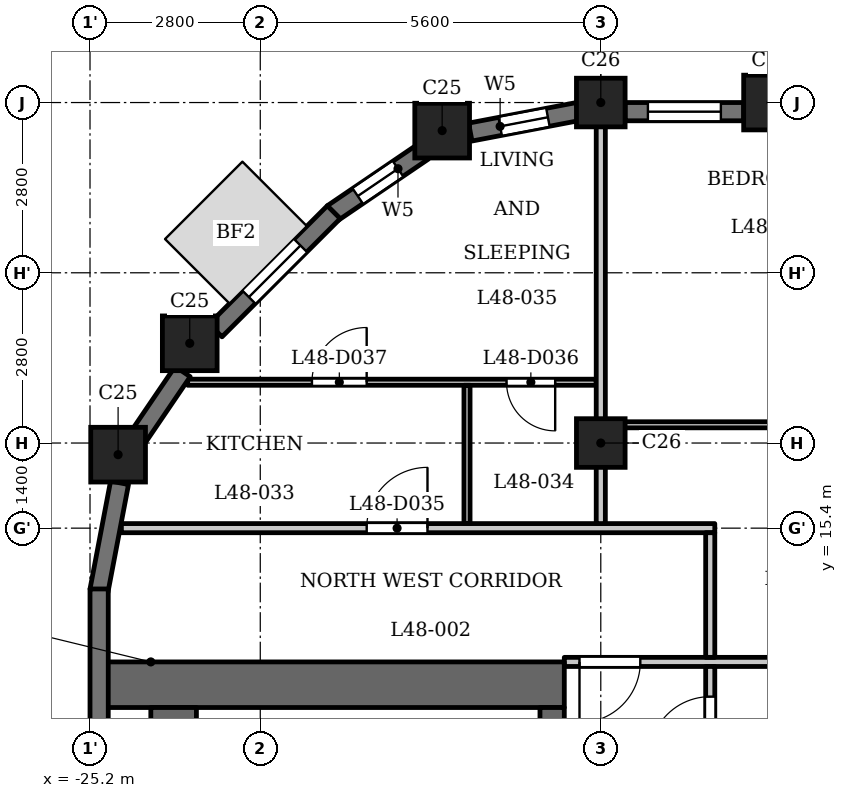
"""IFC4 building model, lengths in metres.
Left out: names, types, materials, properties, quantities, classifications, styles, units other than length and angle.
Written with IfcOpenShell. Run it as: python <this file> out.ifc"""

import sys

from ifc_helpers import new_model, si_unit, direction, frame, frame_2d, origin, origin_2d, place, context, subcontext, project, spatial, rectangle, extrude, element, fill, save


model = new_model("IFC4")
c1 = context("Model", 3, precision=1e-05, world=origin(), true_north=direction((0.0, 1.0)))
c2 = subcontext(c1, "Body", "Model", "MODEL_VIEW")
j1 = project(units=[si_unit("LENGTHUNIT", "METRE"), si_unit("PLANEANGLEUNIT", "RADIAN")], contexts=[c1])
p1 = place(None, origin())
s1 = spatial("IfcSite", under=j1, at=p1, CompositionType="ELEMENT")
p2 = place(p1, origin())
s2 = spatial("IfcBuilding", under=s1, at=p2, CompositionType="ELEMENT")
p3 = place(p2, frame((0.0, 0.0, 188.9)))
s3 = spatial("IfcBuildingStorey", under=s2, at=p3, CompositionType="ELEMENT", Elevation=188.9)
for number, where, z_axis, x_axis in (
    (1, (-14.0, 22.4, 0.0), (0.0, 0.0, 1.0), (1.0, 0.0, 0.0)),
    (2, (-19.409, 21.938, 0.0), (0.0, 0.0, 1.0), (1.0, 0.0, 0.0)),
    (3, (-23.56, 18.44, 0.0), (0.0, 0.0, 1.0), (1.0, 0.0, 0.0)),
    (4, (-24.738, 16.609, 0.0), (0.0, 0.0, 1.0), (1.0, 0.0, 0.0)),
):
    element("IfcColumn", number, at=place(p3, frame(where, z_axis=z_axis, x_axis=x_axis)), inside=s3, PredefinedType="COLUMN", context=c2, shape_type="SweptSolid", body=[
        extrude(rectangle(XDim=0.9, YDim=0.9, at=origin_2d()), origin(), (0.0, 0.0, 1.0), 3.5),
    ])
for number, where, z_axis, x_axis in (
    (5, (-16.8, 16.8, 0.0), (0.0, 0.0, 1.0), (1.0, 0.0, 0.0)),
    (6, (-16.8, 22.4, 0.0), (0.0, 0.0, 1.0), (1.0, 0.0, 0.0)),
):
    element("IfcColumn", number, at=place(p3, frame(where, z_axis=z_axis, x_axis=x_axis)), inside=s3, PredefinedType="COLUMN", context=c2, shape_type="SweptSolid", body=[
        extrude(rectangle(XDim=0.8, YDim=0.8, at=origin_2d()), origin(), (0.0, 0.0, 1.0), 3.5),
    ])
p4 = place(p3, frame((-14.45, 22.25, 0.0), z_axis=(0.0, 0.0, 1.0), x_axis=(-1.0, 0.0, 0.0)))
e7 = element("IfcWall", 7, at=p4, inside=s3, PredefinedType="SOLIDWALL", context=c2, shape_type="SweptSolid", body=[
    extrude(rectangle(XDim=1.95, YDim=0.3, at=frame_2d((0.975, 0.0))), origin(), (0.0, 0.0, 1.0), 2.5),
])
p5 = place(p4, frame((0.375, 0.0, 0.6)))
e8 = element("IfcOpeningElement", 8, at=p5, cuts=e7, PredefinedType="OPENING", context=c2, shape_type="SweptSolid", body=[
    extrude(rectangle(XDim=1.2, YDim=1.55, at=frame_2d((0.6, 0.775))), frame((0.0, 0.16, 0.0), z_axis=(0.0, -1.0, 0.0), x_axis=(1.0, 0.0, 0.0)), (0.0, 0.0, 1.0), 0.32),
])
p6 = place(p3, frame((-17.179, 22.251, 0.0), z_axis=(0.0, 0.0, 1.0), x_axis=(-0.98230529033, -0.187286722942, 0.0)))
e9 = element("IfcWall", 9, at=p6, inside=s3, PredefinedType="SOLIDWALL", context=c2, shape_type="SweptSolid", body=[
    extrude(rectangle(XDim=1.799, YDim=0.3, at=frame_2d((0.899, 0.0))), origin(), (0.0, 0.0, 1.0), 2.5),
])
p7 = place(p6, frame((0.5, 0.0, 0.6)))
e10 = element("IfcOpeningElement", 10, at=p7, cuts=e9, PredefinedType="OPENING", context=c2, shape_type="SweptSolid", body=[
    extrude(rectangle(XDim=0.8, YDim=1.55, at=frame_2d((0.4, 0.775))), frame((0.0, 0.16, 0.0), z_axis=(0.0, -1.0, 0.0), x_axis=(1.0, 0.0, 0.0)), (0.0, 0.0, 1.0), 0.32),
])
p8 = place(p3, frame((-19.719, 21.594, 0.0), z_axis=(0.0, 0.0, 1.0), x_axis=(-0.827067282455, -0.562102935673, 0.0)))
e11 = element("IfcWall", 11, at=p8, inside=s3, PredefinedType="SOLIDWALL", context=c2, shape_type="SweptSolid", body=[
    extrude(rectangle(XDim=1.806, YDim=0.3, at=frame_2d((0.903, 0.0))), origin(), (0.0, 0.0, 1.0), 2.5),
])
p9 = place(p8, frame((0.503, 0.0, 0.6)))
e12 = element("IfcOpeningElement", 12, at=p9, cuts=e11, PredefinedType="OPENING", context=c2, shape_type="SweptSolid", body=[
    extrude(rectangle(XDim=0.8, YDim=1.55, at=frame_2d((0.4, 0.775))), frame((0.0, 0.16, 0.0), z_axis=(0.0, -1.0, 0.0), x_axis=(1.0, 0.0, 0.0)), (0.0, 0.0, 1.0), 0.32),
])
p10 = place(p3, frame((-21.191, 20.597, 0.0), z_axis=(0.0, 0.0, 1.0), x_axis=(-0.707106781187, -0.707106781187, 0.0)))
e13 = element("IfcWall", 13, at=p10, inside=s3, PredefinedType="SOLIDWALL", context=c2, shape_type="SweptSolid", body=[
    extrude(rectangle(XDim=2.75, YDim=0.3, at=frame_2d((1.375, 0.0))), origin(), (0.0, 0.0, 1.0), 2.5),
])
p11 = place(p10, frame((0.775, 0.0, 0.6)))
e14 = element("IfcOpeningElement", 14, at=p11, cuts=e13, PredefinedType="OPENING", context=c2, shape_type="SweptSolid", body=[
    extrude(rectangle(XDim=1.2, YDim=1.55, at=frame_2d((0.6, 0.775))), frame((0.0, 0.16, 0.0), z_axis=(0.0, -1.0, 0.0), x_axis=(1.0, 0.0, 0.0)), (0.0, 0.0, 1.0), 0.32),
])
p12 = place(p3, frame((-23.676, 17.975, 0.0), z_axis=(0.0, 0.0, 1.0), x_axis=(-0.56200149592, -0.827136215253, 0.0)))
e15 = element("IfcWall", 15, at=p12, inside=s3, PredefinedType="SOLIDWALL", context=c2, shape_type="SweptSolid", body=[
    extrude(rectangle(XDim=1.277, YDim=0.3, at=frame_2d((0.639, 0.0))), origin(), (0.0, 0.0, 1.0), 2.5),
])
p13 = place(p3, frame((-24.714, 16.146, 0.0), z_axis=(0.0, 0.0, 1.0), x_axis=(-0.187348135549, -0.982293579388, 0.0)))
e16 = element("IfcWall", 16, at=p13, inside=s3, PredefinedType="SOLIDWALL", context=c2, shape_type="SweptSolid", body=[
    extrude(rectangle(XDim=1.806, YDim=0.3, at=frame_2d((0.903, 0.0))), origin(), (0.0, 0.0, 1.0), 2.5),
])
p14 = place(p3, frame((-25.05, 14.4, 0.0), z_axis=(0.0, 0.0, 1.0), x_axis=(0.0, -1.0, 0.0)))
e17 = element("IfcWall", 17, at=p14, inside=s3, PredefinedType="SOLIDWALL", context=c2, shape_type="SweptSolid", body=[
    extrude(rectangle(XDim=2.75, YDim=0.3, at=frame_2d((1.375, 0.0))), origin(), (0.0, 0.0, 1.0), 2.5),
])
p15 = place(p3, frame((-17.4, 12.825, 0.0), z_axis=(0.0, 0.0, 1.0), x_axis=(-1.0, 0.0, 0.0)))
e18 = element("IfcWall", 18, at=p15, inside=s3, PredefinedType="SHEAR", context=c2, shape_type="SweptSolid", body=[
    extrude(rectangle(XDim=7.6, YDim=0.75, at=frame_2d((3.8, 0.0))), origin(), (0.0, 0.0, 1.0), 3.2),
])
p16 = place(p3, frame((-17.6, -12.45, 0.0), z_axis=(0.0, 0.0, 1.0), x_axis=(0.0, 1.0, 0.0)))
e19 = element("IfcWall", 19, at=p16, inside=s3, PredefinedType="SHEAR", context=c2, shape_type="SweptSolid", body=[
    extrude(rectangle(XDim=24.9, YDim=0.4, at=frame_2d((12.45, 0.0))), origin(), (0.0, 0.0, 1.0), 3.2),
])
p17 = place(p16, frame((6.325, 0.0, 0.0)))
e20 = element("IfcOpeningElement", 20, at=p17, cuts=e19, PredefinedType="OPENING", context=c2, shape_type="SweptSolid", body=[
    extrude(rectangle(XDim=0.9, YDim=2.1, at=frame_2d((0.45, 1.05))), frame((0.0, 0.21, 0.0), z_axis=(0.0, -1.0, 0.0), x_axis=(1.0, 0.0, 0.0)), (0.0, 0.0, 1.0), 0.42),
])
p18 = place(p16, frame((9.925, 0.0, 0.0)))
e21 = element("IfcOpeningElement", 21, at=p18, cuts=e19, PredefinedType="OPENING", context=c2, shape_type="SweptSolid", body=[
    extrude(rectangle(XDim=0.9, YDim=2.1, at=frame_2d((0.45, 1.05))), frame((0.0, 0.21, 0.0), z_axis=(0.0, -1.0, 0.0), x_axis=(1.0, 0.0, 0.0)), (0.0, 0.0, 1.0), 0.42),
])
p19 = place(p16, frame((15.6, 0.0, 0.0)))
e22 = element("IfcOpeningElement", 22, at=p19, cuts=e19, PredefinedType="OPENING", context=c2, shape_type="SweptSolid", body=[
    extrude(rectangle(XDim=1.1, YDim=2.1, at=frame_2d((0.55, 1.05))), frame((0.0, 0.21, 0.0), z_axis=(0.0, -1.0, 0.0), x_axis=(1.0, 0.0, 0.0)), (0.0, 0.0, 1.0), 0.42),
])
p20 = place(p16, frame((18.0, 0.0, 0.0)))
e23 = element("IfcOpeningElement", 23, at=p20, cuts=e19, PredefinedType="OPENING", context=c2, shape_type="SweptSolid", body=[
    extrude(rectangle(XDim=1.1, YDim=2.1, at=frame_2d((0.55, 1.05))), frame((0.0, 0.21, 0.0), z_axis=(0.0, -1.0, 0.0), x_axis=(1.0, 0.0, 0.0)), (0.0, 0.0, 1.0), 0.42),
])
p21 = place(p16, frame((23.025, 0.0, 0.0)))
e24 = element("IfcOpeningElement", 24, at=p21, cuts=e19, PredefinedType="OPENING", context=c2, shape_type="SweptSolid", body=[
    extrude(rectangle(XDim=1.1, YDim=2.1, at=frame_2d((0.55, 1.05))), frame((0.0, 0.21, 0.0), z_axis=(0.0, -1.0, 0.0), x_axis=(1.0, 0.0, 0.0)), (0.0, 0.0, 1.0), 0.42),
])
p22 = place(p16, frame((0.775, 0.0, 0.0)))
e25 = element("IfcOpeningElement", 25, at=p22, cuts=e19, PredefinedType="OPENING", context=c2, shape_type="SweptSolid", body=[
    extrude(rectangle(XDim=1.1, YDim=2.1, at=frame_2d((0.55, 1.05))), frame((0.0, 0.21, 0.0), z_axis=(0.0, -1.0, 0.0), x_axis=(1.0, 0.0, 0.0)), (0.0, 0.0, 1.0), 0.42),
])
p23 = place(p16, frame((12.925, 0.0, 0.0)))
e26 = element("IfcOpeningElement", 26, at=p23, cuts=e19, PredefinedType="OPENING", context=c2, shape_type="SweptSolid", body=[
    extrude(rectangle(XDim=1.8, YDim=2.1, at=frame_2d((0.9, 1.05))), frame((0.0, 0.21, 0.0), z_axis=(0.0, -1.0, 0.0), x_axis=(1.0, 0.0, 0.0)), (0.0, 0.0, 1.0), 0.42),
])
p24 = place(p3, frame((-23.825, -12.45, 0.0), z_axis=(0.0, 0.0, 1.0), x_axis=(0.0, 1.0, 0.0)))
e27 = element("IfcWall", 27, at=p24, inside=s3, PredefinedType="SHEAR", context=c2, shape_type="SweptSolid", body=[
    extrude(rectangle(XDim=24.9, YDim=0.75, at=frame_2d((12.45, 0.0))), origin(), (0.0, 0.0, 1.0), 3.2),
])
p25 = place(p3, frame((-17.4, 13.2, 0.0), z_axis=(0.0, 0.0, 1.0), x_axis=(1.0, 0.0, 0.0)))
e28 = element("IfcWall", 28, at=p25, inside=s3, PredefinedType="PARTITIONING", context=c2, shape_type="SweptSolid", body=[
    extrude(rectangle(XDim=34.8, YDim=0.15, at=frame_2d((17.4, 0.0))), origin(), (0.0, 0.0, 1.0), 3.2),
])
p26 = place(p25, frame((0.25, 0.0, 0.0)))
e29 = element("IfcOpeningElement", 29, at=p26, cuts=e28, PredefinedType="OPENING", context=c2, shape_type="SweptSolid", body=[
    extrude(rectangle(XDim=1.0, YDim=2.1, at=frame_2d((0.5, 1.05))), frame((0.0, 0.085, 0.0), z_axis=(0.0, -1.0, 0.0), x_axis=(1.0, 0.0, 0.0)), (0.0, 0.0, 1.0), 0.17),
])
p27 = place(p25, frame((33.65, 0.0, 0.0)))
e30 = element("IfcOpeningElement", 30, at=p27, cuts=e28, PredefinedType="OPENING", context=c2, shape_type="SweptSolid", body=[
    extrude(rectangle(XDim=1.0, YDim=2.1, at=frame_2d((0.5, 1.05))), frame((0.0, 0.085, 0.0), z_axis=(0.0, -1.0, 0.0), x_axis=(1.0, 0.0, 0.0)), (0.0, 0.0, 1.0), 0.17),
])
p28 = place(p25, frame((10.15, 0.0, 0.0)))
e31 = element("IfcOpeningElement", 31, at=p28, cuts=e28, PredefinedType="OPENING", context=c2, shape_type="SweptSolid", body=[
    extrude(rectangle(XDim=1.0, YDim=2.1, at=frame_2d((0.5, 1.05))), frame((0.0, 0.085, 0.0), z_axis=(0.0, -1.0, 0.0), x_axis=(1.0, 0.0, 0.0)), (0.0, 0.0, 1.0), 0.17),
])
p29 = place(p25, frame((13.55, 0.0, 0.0)))
e32 = element("IfcOpeningElement", 32, at=p29, cuts=e28, PredefinedType="OPENING", context=c2, shape_type="SweptSolid", body=[
    extrude(rectangle(XDim=1.0, YDim=2.1, at=frame_2d((0.5, 1.05))), frame((0.0, 0.085, 0.0), z_axis=(0.0, -1.0, 0.0), x_axis=(1.0, 0.0, 0.0)), (0.0, 0.0, 1.0), 0.17),
])
p30 = place(p25, frame((20.85, 0.0, 0.0)))
e33 = element("IfcOpeningElement", 33, at=p30, cuts=e28, PredefinedType="OPENING", context=c2, shape_type="SweptSolid", body=[
    extrude(rectangle(XDim=1.0, YDim=2.1, at=frame_2d((0.5, 1.05))), frame((0.0, 0.085, 0.0), z_axis=(0.0, -1.0, 0.0), x_axis=(1.0, 0.0, 0.0)), (0.0, 0.0, 1.0), 0.17),
])
p31 = place(p25, frame((23.7, 0.0, 0.0)))
e34 = element("IfcOpeningElement", 34, at=p31, cuts=e28, PredefinedType="OPENING", context=c2, shape_type="SweptSolid", body=[
    extrude(rectangle(XDim=1.0, YDim=2.1, at=frame_2d((0.5, 1.05))), frame((0.0, 0.085, 0.0), z_axis=(0.0, -1.0, 0.0), x_axis=(1.0, 0.0, 0.0)), (0.0, 0.0, 1.0), 0.17),
])
p32 = place(p3, frame((-24.684, 15.4, 0.0), z_axis=(0.0, 0.0, 1.0), x_axis=(1.0, 0.0, 0.0)))
e35 = element("IfcWall", 35, at=p32, inside=s3, PredefinedType="PARTITIONING", context=c2, shape_type="SweptSolid", body=[
    extrude(rectangle(XDim=9.759, YDim=0.15, at=frame_2d((4.879, 0.0))), origin(), (0.0, 0.0, 1.0), 3.2),
])
p33 = place(p32, frame((4.034, 0.0, 0.0)))
e36 = element("IfcOpeningElement", 36, at=p33, cuts=e35, PredefinedType="OPENING", context=c2, shape_type="SweptSolid", body=[
    extrude(rectangle(XDim=1.0, YDim=2.1, at=frame_2d((0.5, 1.05))), frame((0.0, 0.085, 0.0), z_axis=(0.0, -1.0, 0.0), x_axis=(1.0, 0.0, 0.0)), (0.0, 0.0, 1.0), 0.17),
])
p34 = place(p3, frame((-16.725, 17.1, 0.0), z_axis=(0.0, 0.0, 1.0), x_axis=(1.0, 0.0, 0.0)))
e37 = element("IfcWall", 37, at=p34, inside=s3, PredefinedType="PARTITIONING", context=c2, shape_type="SweptSolid", body=[
    extrude(rectangle(XDim=33.45, YDim=0.1, at=frame_2d((16.725, 0.0))), origin(), (0.0, 0.0, 1.0), 3.2),
])
p35 = place(p34, frame((4.075, 0.0, 0.0)))
e38 = element("IfcOpeningElement", 38, at=p35, cuts=e37, PredefinedType="OPENING", context=c2, shape_type="SweptSolid", body=[
    extrude(rectangle(XDim=0.8, YDim=2.1, at=frame_2d((0.4, 1.05))), frame((0.0, 0.06, 0.0), z_axis=(0.0, -1.0, 0.0), x_axis=(1.0, 0.0, 0.0)), (0.0, 0.0, 1.0), 0.12),
])
p36 = place(p34, frame((9.575, 0.0, 0.0)))
e39 = element("IfcOpeningElement", 39, at=p36, cuts=e37, PredefinedType="OPENING", context=c2, shape_type="SweptSolid", body=[
    extrude(rectangle(XDim=0.9, YDim=2.1, at=frame_2d((0.45, 1.05))), frame((0.0, 0.06, 0.0), z_axis=(0.0, -1.0, 0.0), x_axis=(1.0, 0.0, 0.0)), (0.0, 0.0, 1.0), 0.12),
])
p37 = place(p34, frame((15.175, 0.0, 0.0)))
e40 = element("IfcOpeningElement", 40, at=p37, cuts=e37, PredefinedType="OPENING", context=c2, shape_type="SweptSolid", body=[
    extrude(rectangle(XDim=0.8, YDim=2.1, at=frame_2d((0.4, 1.05))), frame((0.0, 0.06, 0.0), z_axis=(0.0, -1.0, 0.0), x_axis=(1.0, 0.0, 0.0)), (0.0, 0.0, 1.0), 0.12),
])
p38 = place(p34, frame((12.975, 0.0, 0.0)))
e41 = element("IfcOpeningElement", 41, at=p38, cuts=e37, PredefinedType="OPENING", context=c2, shape_type="SweptSolid", body=[
    extrude(rectangle(XDim=0.9, YDim=2.1, at=frame_2d((0.45, 1.05))), frame((0.0, 0.06, 0.0), z_axis=(0.0, -1.0, 0.0), x_axis=(1.0, 0.0, 0.0)), (0.0, 0.0, 1.0), 0.12),
])
p39 = place(p34, frame((17.625, 0.0, 0.0)))
e42 = element("IfcOpeningElement", 42, at=p39, cuts=e37, PredefinedType="OPENING", context=c2, shape_type="SweptSolid", body=[
    extrude(rectangle(XDim=0.8, YDim=2.1, at=frame_2d((0.4, 1.05))), frame((0.0, 0.06, 0.0), z_axis=(0.0, -1.0, 0.0), x_axis=(1.0, 0.0, 0.0)), (0.0, 0.0, 1.0), 0.12),
])
p40 = place(p34, frame((20.025, 0.0, 0.0)))
e43 = element("IfcOpeningElement", 43, at=p40, cuts=e37, PredefinedType="OPENING", context=c2, shape_type="SweptSolid", body=[
    extrude(rectangle(XDim=0.9, YDim=2.1, at=frame_2d((0.45, 1.05))), frame((0.0, 0.06, 0.0), z_axis=(0.0, -1.0, 0.0), x_axis=(1.0, 0.0, 0.0)), (0.0, 0.0, 1.0), 0.12),
])
p41 = place(p34, frame((31.975, 0.0, 0.0)))
e44 = element("IfcOpeningElement", 44, at=p41, cuts=e37, PredefinedType="OPENING", context=c2, shape_type="SweptSolid", body=[
    extrude(rectangle(XDim=0.8, YDim=2.1, at=frame_2d((0.4, 1.05))), frame((0.0, 0.06, 0.0), z_axis=(0.0, -1.0, 0.0), x_axis=(1.0, 0.0, 0.0)), (0.0, 0.0, 1.0), 0.12),
])
p42 = place(p34, frame((29.775, 0.0, 0.0)))
e45 = element("IfcOpeningElement", 45, at=p42, cuts=e37, PredefinedType="OPENING", context=c2, shape_type="SweptSolid", body=[
    extrude(rectangle(XDim=0.9, YDim=2.1, at=frame_2d((0.45, 1.05))), frame((0.0, 0.06, 0.0), z_axis=(0.0, -1.0, 0.0), x_axis=(1.0, 0.0, 0.0)), (0.0, 0.0, 1.0), 0.12),
])
p43 = place(p34, frame((23.025, 0.0, 0.0)))
e46 = element("IfcOpeningElement", 46, at=p43, cuts=e37, PredefinedType="OPENING", context=c2, shape_type="SweptSolid", body=[
    extrude(rectangle(XDim=0.9, YDim=2.1, at=frame_2d((0.45, 1.05))), frame((0.0, 0.06, 0.0), z_axis=(0.0, -1.0, 0.0), x_axis=(1.0, 0.0, 0.0)), (0.0, 0.0, 1.0), 0.12),
])
p44 = place(p34, frame((26.125, 0.0, 0.0)))
e47 = element("IfcOpeningElement", 47, at=p44, cuts=e37, PredefinedType="OPENING", context=c2, shape_type="SweptSolid", body=[
    extrude(rectangle(XDim=0.9, YDim=2.1, at=frame_2d((0.45, 1.05))), frame((0.0, 0.06, 0.0), z_axis=(0.0, -1.0, 0.0), x_axis=(1.0, 0.0, 0.0)), (0.0, 0.0, 1.0), 0.12),
])
p45 = place(p3, frame((-23.594, 17.8, 0.0), z_axis=(0.0, 0.0, 1.0), x_axis=(1.0, 0.0, 0.0)))
e48 = element("IfcWall", 48, at=p45, inside=s3, PredefinedType="PARTITIONING", context=c2, shape_type="SweptSolid", body=[
    extrude(rectangle(XDim=6.719, YDim=0.1, at=frame_2d((3.359, 0.0))), origin(), (0.0, 0.0, 1.0), 3.2),
])
p46 = place(p45, frame((5.244, 0.0, 0.0)))
e49 = element("IfcOpeningElement", 49, at=p46, cuts=e48, PredefinedType="OPENING", context=c2, shape_type="SweptSolid", body=[
    extrude(rectangle(XDim=0.8, YDim=2.1, at=frame_2d((0.4, 1.05))), frame((0.0, 0.06, 0.0), z_axis=(0.0, -1.0, 0.0), x_axis=(1.0, 0.0, 0.0)), (0.0, 0.0, 1.0), 0.12),
])
p47 = place(p45, frame((2.044, 0.0, 0.0)))
e50 = element("IfcOpeningElement", 50, at=p47, cuts=e48, PredefinedType="OPENING", context=c2, shape_type="SweptSolid", body=[
    extrude(rectangle(XDim=0.9, YDim=2.1, at=frame_2d((0.45, 1.05))), frame((0.0, 0.06, 0.0), z_axis=(0.0, -1.0, 0.0), x_axis=(1.0, 0.0, 0.0)), (0.0, 0.0, 1.0), 0.12),
])
p48 = place(p3, frame((-19.0, 15.475, 0.0), z_axis=(0.0, 0.0, 1.0), x_axis=(0.0, 1.0, 0.0)))
e51 = element("IfcWall", 51, at=p48, inside=s3, PredefinedType="PARTITIONING", context=c2, shape_type="SweptSolid", body=[
    extrude(rectangle(XDim=2.275, YDim=0.1, at=frame_2d((1.137, 0.0))), origin(), (0.0, 0.0, 1.0), 3.2),
])
p49 = place(p3, frame((-16.8, 15.475, 0.0), z_axis=(0.0, 0.0, 1.0), x_axis=(0.0, 1.0, 0.0)))
e52 = element("IfcWall", 52, at=p49, inside=s3, PredefinedType="PARTITIONING", context=c2, shape_type="SweptSolid", body=[
    extrude(rectangle(XDim=6.835, YDim=0.15, at=frame_2d((3.417, 0.0))), origin(), (0.0, 0.0, 1.0), 2.55),
])
p50 = place(p3, frame((-15.0, 6.769, 0.0), z_axis=(0.0, 0.0, 1.0), x_axis=(0.0, 1.0, 0.0)))
e53 = element("IfcWall", 53, at=p50, inside=s3, PredefinedType="PARTITIONING", context=c2, shape_type="SweptSolid", body=[
    extrude(rectangle(XDim=6.356, YDim=0.15, at=frame_2d((3.178, 0.0))), origin(), (0.0, 0.0, 1.0), 3.2),
])
p51 = place(p50, frame((4.86, 0.0, 0.0)))
e54 = element("IfcOpeningElement", 54, at=p51, cuts=e53, PredefinedType="OPENING", context=c2, shape_type="SweptSolid", body=[
    extrude(rectangle(XDim=1.0, YDim=2.1, at=frame_2d((0.5, 1.05))), frame((0.0, 0.085, 0.0), z_axis=(0.0, -1.0, 0.0), x_axis=(1.0, 0.0, 0.0)), (0.0, 0.0, 1.0), 0.17),
])
p52 = place(p3, frame((-15.0, 13.275, 0.0), z_axis=(0.0, 0.0, 1.0), x_axis=(0.0, 1.0, 0.0)))
e55 = element("IfcWall", 55, at=p52, inside=s3, PredefinedType="PARTITIONING", context=c2, shape_type="SweptSolid", body=[
    extrude(rectangle(XDim=2.05, YDim=0.15, at=frame_2d((1.025, 0.0))), origin(), (0.0, 0.0, 1.0), 3.2),
])
p53 = place(p51, origin())
e56 = element("IfcDoor", 56, at=p53, inside=s3, OperationType="SINGLE_SWING_RIGHT", PredefinedType="DOOR", context=c2, shape_type="SweptSolid", body=[
    extrude(rectangle(XDim=1.0, YDim=2.1, at=frame_2d((0.5, 1.05))), frame((0.0, 0.025, 0.0), z_axis=(0.0, -1.0, 0.0), x_axis=(1.0, 0.0, 0.0)), (0.0, 0.0, 1.0), 0.05),
])
fill(e54, e56)
p54 = place(p26, origin())
e57 = element("IfcDoor", 57, at=p54, inside=s3, OperationType="SINGLE_SWING_LEFT", PredefinedType="DOOR", context=c2, shape_type="SweptSolid", body=[
    extrude(rectangle(XDim=1.0, YDim=2.1, at=frame_2d((0.5, 1.05))), frame((0.0, 0.025, 0.0), z_axis=(0.0, -1.0, 0.0), x_axis=(1.0, 0.0, 0.0)), (0.0, 0.0, 1.0), 0.05),
])
fill(e29, e57)
p55 = place(p33, origin())
e58 = element("IfcDoor", 58, at=p55, inside=s3, OperationType="SINGLE_SWING_LEFT", PredefinedType="DOOR", context=c2, shape_type="SweptSolid", body=[
    extrude(rectangle(XDim=1.0, YDim=2.1, at=frame_2d((0.5, 1.05))), frame((0.0, 0.025, 0.0), z_axis=(0.0, -1.0, 0.0), x_axis=(1.0, 0.0, 0.0)), (0.0, 0.0, 1.0), 0.05),
])
fill(e36, e58)
p56 = place(p46, origin())
e59 = element("IfcDoor", 59, at=p56, inside=s3, OperationType="SINGLE_SWING_RIGHT", PredefinedType="DOOR", context=c2, shape_type="SweptSolid", body=[
    extrude(rectangle(XDim=0.8, YDim=2.1, at=frame_2d((0.4, 1.05))), frame((0.0, 0.025, 0.0), z_axis=(0.0, -1.0, 0.0), x_axis=(1.0, 0.0, 0.0)), (0.0, 0.0, 1.0), 0.05),
])
fill(e49, e59)
p57 = place(p47, origin())
e60 = element("IfcDoor", 60, at=p57, inside=s3, OperationType="SINGLE_SWING_LEFT", PredefinedType="DOOR", context=c2, shape_type="SweptSolid", body=[
    extrude(rectangle(XDim=0.9, YDim=2.1, at=frame_2d((0.45, 1.05))), frame((0.0, 0.025, 0.0), z_axis=(0.0, -1.0, 0.0), x_axis=(1.0, 0.0, 0.0)), (0.0, 0.0, 1.0), 0.05),
])
fill(e50, e60)
p58 = place(p5, origin())
e61 = element("IfcWindow", 61, at=p58, inside=s3, PartitioningType="SINGLE_PANEL", PredefinedType="WINDOW", context=c2, shape_type="SweptSolid", body=[
    extrude(rectangle(XDim=1.2, YDim=1.55, at=frame_2d((0.6, 0.775))), frame((0.0, 0.03, 0.0), z_axis=(0.0, -1.0, 0.0), x_axis=(1.0, 0.0, 0.0)), (0.0, 0.0, 1.0), 0.06),
])
fill(e8, e61)
p59 = place(p7, origin())
e62 = element("IfcWindow", 62, at=p59, inside=s3, PartitioningType="SINGLE_PANEL", PredefinedType="WINDOW", context=c2, shape_type="SweptSolid", body=[
    extrude(rectangle(XDim=0.8, YDim=1.55, at=frame_2d((0.4, 0.775))), frame((0.0, 0.03, 0.0), z_axis=(0.0, -1.0, 0.0), x_axis=(1.0, 0.0, 0.0)), (0.0, 0.0, 1.0), 0.06),
])
fill(e10, e62)
p60 = place(p9, origin())
e63 = element("IfcWindow", 63, at=p60, inside=s3, PartitioningType="SINGLE_PANEL", PredefinedType="WINDOW", context=c2, shape_type="SweptSolid", body=[
    extrude(rectangle(XDim=0.8, YDim=1.55, at=frame_2d((0.4, 0.775))), frame((0.0, 0.03, 0.0), z_axis=(0.0, -1.0, 0.0), x_axis=(1.0, 0.0, 0.0)), (0.0, 0.0, 1.0), 0.06),
])
fill(e12, e63)
p61 = place(p11, origin())
e64 = element("IfcWindow", 64, at=p61, inside=s3, PartitioningType="SINGLE_PANEL", PredefinedType="WINDOW", context=c2, shape_type="SweptSolid", body=[
    extrude(rectangle(XDim=1.2, YDim=1.55, at=frame_2d((0.6, 0.775))), frame((0.0, 0.03, 0.0), z_axis=(0.0, -1.0, 0.0), x_axis=(1.0, 0.0, 0.0)), (0.0, 0.0, 1.0), 0.06),
])
fill(e14, e64)
save(model, sys.argv[1])
